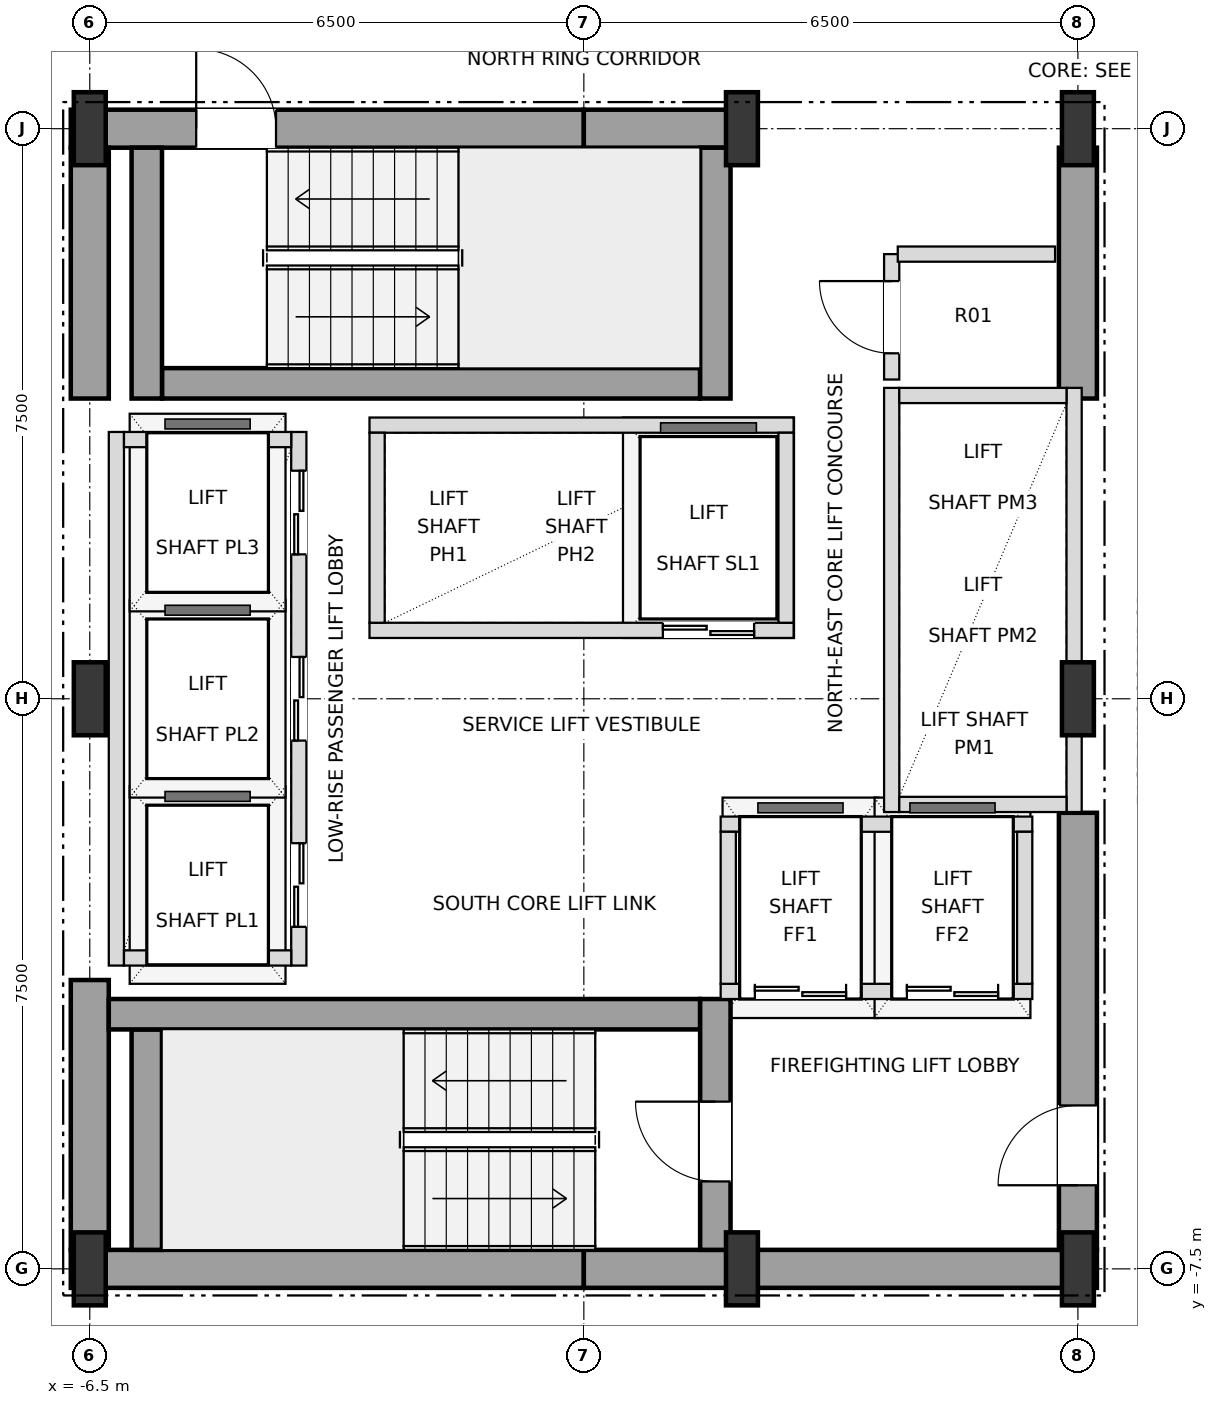
"""IFC4 building model, lengths in metres.
Left out: names, types, materials, properties, quantities, classifications, styles, units other than length and angle.
Written with IfcOpenShell. Run it as: python <this file> out.ifc"""

import sys

from ifc_helpers import new_model, si_unit, direction, frame, frame_2d, origin, origin_2d, place, context, subcontext, project, spatial, rectangle, i_section, extrude, element, fill, save


model = new_model("IFC4")
c1 = context("Model", 3, precision=1e-05, world=origin(), true_north=direction((0.0, 1.0)))
c2 = subcontext(c1, "Body", "Model", "MODEL_VIEW")
j1 = project(units=[si_unit("LENGTHUNIT", "METRE"), si_unit("PLANEANGLEUNIT", "RADIAN")], contexts=[c1])
p1 = place(None, origin())
s1 = spatial("IfcSite", under=j1, at=p1, CompositionType="ELEMENT")
p2 = place(p1, origin())
s2 = spatial("IfcBuilding", under=s1, at=p2, CompositionType="ELEMENT")
p3 = place(p2, frame((0.0, 0.0, 54.0)))
s3 = spatial("IfcBuildingStorey", under=s2, at=p3, CompositionType="ELEMENT", Elevation=54.0)
for number, where, z_axis, x_axis in (
    (1, (-6.5, -7.5, 0.0), (0.0, 0.0, 1.0), (1.0, 0.0, 0.0)),
    (2, (2.08, -7.5, 0.0), (0.0, 0.0, 1.0), (1.0, 0.0, 0.0)),
    (3, (6.5, -7.5, 0.0), (0.0, 0.0, 1.0), (1.0, 0.0, 0.0)),
    (4, (-6.5, 0.0, 0.0), (0.0, 0.0, 1.0), (1.0, 0.0, 0.0)),
    (5, (6.5, 0.0, 0.0), (0.0, 0.0, 1.0), (1.0, 0.0, 0.0)),
    (6, (-6.5, 7.5, 0.0), (0.0, 0.0, 1.0), (1.0, 0.0, 0.0)),
    (7, (2.08, 7.5, 0.0), (0.0, 0.0, 1.0), (1.0, 0.0, 0.0)),
    (8, (6.5, 7.5, 0.0), (0.0, 0.0, 1.0), (1.0, 0.0, 0.0)),
):
    element("IfcColumn", number, at=place(p3, frame(where, z_axis=z_axis, x_axis=x_axis)), inside=s3, PredefinedType="COLUMN", context=c2, shape_type="SweptSolid", body=[
        extrude(i_section(OverallWidth=0.42, OverallDepth=0.96, WebThickness=0.022, FlangeThickness=0.034, at=origin_2d()), origin(), (0.0, 0.0, 1.0), 3.6),
    ])
for number, where, z_axis, x_axis in (
    (9, (-6.75, -7.5, 0.0), (0.0, 0.0, 1.0), (1.0, 0.0, 0.0)),
    (10, (0.0, -7.5, 0.0), (0.0, 0.0, 1.0), (1.0, 0.0, 0.0)),
):
    element("IfcWall", number, at=place(p3, frame(where, z_axis=z_axis, x_axis=x_axis)), inside=s3, PredefinedType="SHEAR", context=c2, shape_type="SweptSolid", body=[
        extrude(rectangle(XDim=6.75, YDim=0.5, at=frame_2d((3.375, 0.0))), origin(), (0.0, 0.0, 1.0), 3.38),
    ])
p4 = place(p3, frame((-6.75, 7.5, 0.0), z_axis=(0.0, 0.0, 1.0), x_axis=(1.0, 0.0, 0.0)))
e11 = element("IfcWall", 11, at=p4, inside=s3, PredefinedType="SHEAR", context=c2, shape_type="SweptSolid", body=[
    extrude(rectangle(XDim=6.75, YDim=0.5, at=frame_2d((3.375, 0.0))), origin(), (0.0, 0.0, 1.0), 3.38),
])
p5 = place(p4, frame((1.65, 0.0, 0.0)))
e12 = element("IfcOpeningElement", 12, at=p5, cuts=e11, PredefinedType="OPENING", context=c2, shape_type="SweptSolid", body=[
    extrude(rectangle(XDim=1.05, YDim=2.15, at=frame_2d((0.525, 1.075))), frame((0.0, 0.26, 0.0), z_axis=(0.0, -1.0, 0.0), x_axis=(1.0, 0.0, 0.0)), (0.0, 0.0, 1.0), 0.52),
])
p6 = place(p3, frame((0.0, 7.5, 0.0), z_axis=(0.0, 0.0, 1.0), x_axis=(1.0, 0.0, 0.0)))
e13 = element("IfcWall", 13, at=p6, inside=s3, PredefinedType="SHEAR", context=c2, shape_type="SweptSolid", body=[
    extrude(rectangle(XDim=2.08, YDim=0.5, at=frame_2d((1.04, 0.0))), origin(), (0.0, 0.0, 1.0), 3.38),
])
p7 = place(p3, frame((-6.5, -7.25, 0.0), z_axis=(0.0, 0.0, 1.0), x_axis=(0.0, 1.0, 0.0)))
e14 = element("IfcWall", 14, at=p7, inside=s3, PredefinedType="SHEAR", context=c2, shape_type="SweptSolid", body=[
    extrude(rectangle(XDim=3.55, YDim=0.5, at=frame_2d((1.775, 0.0))), origin(), (0.0, 0.0, 1.0), 3.38),
])
p8 = place(p3, frame((-6.5, 3.95, 0.0), z_axis=(0.0, 0.0, 1.0), x_axis=(0.0, 1.0, 0.0)))
e15 = element("IfcWall", 15, at=p8, inside=s3, PredefinedType="SHEAR", context=c2, shape_type="SweptSolid", body=[
    extrude(rectangle(XDim=3.3, YDim=0.5, at=frame_2d((1.65, 0.0))), origin(), (0.0, 0.0, 1.0), 3.38),
])
p9 = place(p3, frame((6.5, -7.25, 0.0), z_axis=(0.0, 0.0, 1.0), x_axis=(0.0, 1.0, 0.0)))
e16 = element("IfcWall", 16, at=p9, inside=s3, PredefinedType="SHEAR", context=c2, shape_type="SweptSolid", body=[
    extrude(rectangle(XDim=5.75, YDim=0.5, at=frame_2d((2.875, 0.0))), origin(), (0.0, 0.0, 1.0), 3.38),
])
p10 = place(p9, frame((0.85, 0.0, 0.0)))
e17 = element("IfcOpeningElement", 17, at=p10, cuts=e16, PredefinedType="OPENING", context=c2, shape_type="SweptSolid", body=[
    extrude(rectangle(XDim=1.05, YDim=2.15, at=frame_2d((0.525, 1.075))), frame((0.0, 0.26, 0.0), z_axis=(0.0, -1.0, 0.0), x_axis=(1.0, 0.0, 0.0)), (0.0, 0.0, 1.0), 0.52),
])
p11 = place(p3, frame((6.5, 3.95, 0.0), z_axis=(0.0, 0.0, 1.0), x_axis=(0.0, 1.0, 0.0)))
e18 = element("IfcWall", 18, at=p11, inside=s3, PredefinedType="SHEAR", context=c2, shape_type="SweptSolid", body=[
    extrude(rectangle(XDim=3.3, YDim=0.5, at=frame_2d((1.65, 0.0))), origin(), (0.0, 0.0, 1.0), 3.38),
])
p12 = place(p3, frame((-5.75, -7.25, 0.0), z_axis=(0.0, 0.0, 1.0), x_axis=(0.0, 1.0, 0.0)))
e19 = element("IfcWall", 19, at=p12, inside=s3, PredefinedType="SHEAR", context=c2, shape_type="SweptSolid", body=[
    extrude(rectangle(XDim=2.9, YDim=0.4, at=frame_2d((1.45, 0.0))), origin(), (0.0, 0.0, 1.0), 3.38),
])
p13 = place(p3, frame((-6.25, -4.15, 0.0), z_axis=(0.0, 0.0, 1.0), x_axis=(1.0, 0.0, 0.0)))
e20 = element("IfcWall", 20, at=p13, inside=s3, PredefinedType="SHEAR", context=c2, shape_type="SweptSolid", body=[
    extrude(rectangle(XDim=7.78, YDim=0.4, at=frame_2d((3.89, 0.0))), origin(), (0.0, 0.0, 1.0), 3.38),
])
p14 = place(p3, frame((1.73, -7.25, 0.0), z_axis=(0.0, 0.0, 1.0), x_axis=(0.0, 1.0, 0.0)))
e21 = element("IfcWall", 21, at=p14, inside=s3, PredefinedType="SHEAR", context=c2, shape_type="SweptSolid", body=[
    extrude(rectangle(XDim=3.3, YDim=0.4, at=frame_2d((1.65, 0.0))), origin(), (0.0, 0.0, 1.0), 3.38),
])
p15 = place(p14, frame((0.9, 0.0, 0.0)))
e22 = element("IfcOpeningElement", 22, at=p15, cuts=e21, PredefinedType="OPENING", context=c2, shape_type="SweptSolid", body=[
    extrude(rectangle(XDim=1.05, YDim=2.15, at=frame_2d((0.525, 1.075))), frame((0.0, 0.21, 0.0), z_axis=(0.0, -1.0, 0.0), x_axis=(1.0, 0.0, 0.0)), (0.0, 0.0, 1.0), 0.42),
])
p16 = place(p3, frame((-5.55, 4.15, 0.0), z_axis=(0.0, 0.0, 1.0), x_axis=(1.0, 0.0, 0.0)))
e23 = element("IfcWall", 23, at=p16, inside=s3, PredefinedType="SHEAR", context=c2, shape_type="SweptSolid", body=[
    extrude(rectangle(XDim=7.08, YDim=0.4, at=frame_2d((3.54, 0.0))), origin(), (0.0, 0.0, 1.0), 3.38),
])
for number, where, z_axis, x_axis in (
    (24, (1.73, 3.95, 0.0), (0.0, 0.0, 1.0), (0.0, 1.0, 0.0)),
    (25, (-5.75, 3.95, 0.0), (0.0, 0.0, 1.0), (0.0, 1.0, 0.0)),
):
    element("IfcWall", number, at=place(p3, frame(where, z_axis=z_axis, x_axis=x_axis)), inside=s3, PredefinedType="SHEAR", context=c2, shape_type="SweptSolid", body=[
        extrude(rectangle(XDim=3.3, YDim=0.4, at=frame_2d((1.65, 0.0))), origin(), (0.0, 0.0, 1.0), 3.38),
    ])
p17 = place(p3, frame((-3.75, -3.51, 0.0), z_axis=(0.0, 0.0, 1.0), x_axis=(0.0, 1.0, 0.0)))
e26 = element("IfcWall", 26, at=p17, inside=s3, PredefinedType="SOLIDWALL", context=c2, shape_type="SweptSolid", body=[
    extrude(rectangle(XDim=7.02, YDim=0.2, at=frame_2d((3.51, 0.0))), origin(), (0.0, 0.0, 1.0), 3.38),
])
p18 = place(p17, frame((0.51, 0.0, 0.0)))
e27 = element("IfcOpeningElement", 27, at=p18, cuts=e26, PredefinedType="OPENING", context=c2, shape_type="SweptSolid", body=[
    extrude(rectangle(XDim=1.1, YDim=2.15, at=frame_2d((0.55, 1.075))), frame((0.0, 0.11, 0.0), z_axis=(0.0, -1.0, 0.0), x_axis=(1.0, 0.0, 0.0)), (0.0, 0.0, 1.0), 0.22),
])
p19 = place(p17, frame((2.96, 0.0, 0.0)))
e28 = element("IfcOpeningElement", 28, at=p19, cuts=e26, PredefinedType="OPENING", context=c2, shape_type="SweptSolid", body=[
    extrude(rectangle(XDim=1.1, YDim=2.15, at=frame_2d((0.55, 1.075))), frame((0.0, 0.11, 0.0), z_axis=(0.0, -1.0, 0.0), x_axis=(1.0, 0.0, 0.0)), (0.0, 0.0, 1.0), 0.22),
])
p20 = place(p17, frame((5.41, 0.0, 0.0)))
e29 = element("IfcOpeningElement", 29, at=p20, cuts=e26, PredefinedType="OPENING", context=c2, shape_type="SweptSolid", body=[
    extrude(rectangle(XDim=1.1, YDim=2.15, at=frame_2d((0.55, 1.075))), frame((0.0, 0.11, 0.0), z_axis=(0.0, -1.0, 0.0), x_axis=(1.0, 0.0, 0.0)), (0.0, 0.0, 1.0), 0.22),
])
p21 = place(p3, frame((-6.15, -3.51, 0.0), z_axis=(0.0, 0.0, 1.0), x_axis=(0.0, 1.0, 0.0)))
e30 = element("IfcWall", 30, at=p21, inside=s3, PredefinedType="SOLIDWALL", context=c2, shape_type="SweptSolid", body=[
    extrude(rectangle(XDim=7.02, YDim=0.2, at=frame_2d((3.51, 0.0))), origin(), (0.0, 0.0, 1.0), 3.38),
])
for number, where, z_axis, x_axis in (
    (31, (-6.05, -3.41, 0.0), (0.0, 0.0, 1.0), (1.0, 0.0, 0.0)),
    (32, (-6.05, 3.41, 0.0), (0.0, 0.0, 1.0), (1.0, 0.0, 0.0)),
):
    element("IfcWall", number, at=place(p3, frame(where, z_axis=z_axis, x_axis=x_axis)), inside=s3, PredefinedType="SOLIDWALL", context=c2, shape_type="SweptSolid", body=[
        extrude(rectangle(XDim=2.2, YDim=0.2, at=frame_2d((1.1, 0.0))), origin(), (0.0, 0.0, 1.0), 3.38),
    ])
p22 = place(p3, frame((4.05, -1.49, 0.0), z_axis=(0.0, 0.0, 1.0), x_axis=(0.0, 1.0, 0.0)))
e33 = element("IfcWall", 33, at=p22, inside=s3, PredefinedType="SOLIDWALL", context=c2, shape_type="SweptSolid", body=[
    extrude(rectangle(XDim=5.58, YDim=0.2, at=frame_2d((2.79, 0.0))), origin(), (0.0, 0.0, 1.0), 3.38),
])
p23 = place(p3, frame((6.45, -1.49, 0.0), z_axis=(0.0, 0.0, 1.0), x_axis=(0.0, 1.0, 0.0)))
e34 = element("IfcWall", 34, at=p23, inside=s3, PredefinedType="SOLIDWALL", context=c2, shape_type="SweptSolid", body=[
    extrude(rectangle(XDim=5.58, YDim=0.2, at=frame_2d((2.79, 0.0))), origin(), (0.0, 0.0, 1.0), 2.816),
])
for number, where, z_axis, x_axis in (
    (35, (4.15, -1.39, 0.0), (0.0, 0.0, 1.0), (1.0, 0.0, 0.0)),
    (36, (4.15, 3.99, 0.0), (0.0, 0.0, 1.0), (1.0, 0.0, 0.0)),
):
    element("IfcWall", number, at=place(p3, frame(where, z_axis=z_axis, x_axis=x_axis)), inside=s3, PredefinedType="SOLIDWALL", context=c2, shape_type="SweptSolid", body=[
        extrude(rectangle(XDim=2.2, YDim=0.2, at=frame_2d((1.1, 0.0))), origin(), (0.0, 0.0, 1.0), 3.38),
    ])
p24 = place(p3, frame((-2.82, 0.9, 0.0), z_axis=(0.0, 0.0, 1.0), x_axis=(1.0, 0.0, 0.0)))
e37 = element("IfcWall", 37, at=p24, inside=s3, PredefinedType="SOLIDWALL", context=c2, shape_type="SweptSolid", body=[
    extrude(rectangle(XDim=5.58, YDim=0.2, at=frame_2d((2.79, 0.0))), origin(), (0.0, 0.0, 1.0), 3.38),
])
p25 = place(p24, frame((3.86, 0.0, 0.0)))
e38 = element("IfcOpeningElement", 38, at=p25, cuts=e37, PredefinedType="OPENING", context=c2, shape_type="SweptSolid", body=[
    extrude(rectangle(XDim=1.2, YDim=2.2, at=frame_2d((0.6, 1.1))), frame((0.0, 0.11, 0.0), z_axis=(0.0, -1.0, 0.0), x_axis=(1.0, 0.0, 0.0)), (0.0, 0.0, 1.0), 0.22),
])
p26 = place(p3, frame((-2.82, 3.6, 0.0), z_axis=(0.0, 0.0, 1.0), x_axis=(1.0, 0.0, 0.0)))
e39 = element("IfcWall", 39, at=p26, inside=s3, PredefinedType="SOLIDWALL", context=c2, shape_type="SweptSolid", body=[
    extrude(rectangle(XDim=5.58, YDim=0.2, at=frame_2d((2.79, 0.0))), origin(), (0.0, 0.0, 1.0), 3.38),
])
for number, where, z_axis, x_axis in (
    (40, (-2.72, 1.0, 0.0), (0.0, 0.0, 1.0), (0.0, 1.0, 0.0)),
    (41, (2.66, 1.0, 0.0), (0.0, 0.0, 1.0), (0.0, 1.0, 0.0)),
):
    element("IfcWall", number, at=place(p3, frame(where, z_axis=z_axis, x_axis=x_axis)), inside=s3, PredefinedType="SOLIDWALL", context=c2, shape_type="SweptSolid", body=[
        extrude(rectangle(XDim=2.5, YDim=0.2, at=frame_2d((1.25, 0.0))), origin(), (0.0, 0.0, 1.0), 3.38),
    ])
p27 = place(p3, frame((1.8, -3.85, 0.0), z_axis=(0.0, 0.0, 1.0), x_axis=(1.0, 0.0, 0.0)))
e42 = element("IfcWall", 42, at=p27, inside=s3, PredefinedType="SOLIDWALL", context=c2, shape_type="SweptSolid", body=[
    extrude(rectangle(XDim=4.1, YDim=0.2, at=frame_2d((2.05, 0.0))), origin(), (0.0, 0.0, 1.0), 3.38),
])
p28 = place(p27, frame((0.45, 0.0, 0.0)))
e43 = element("IfcOpeningElement", 43, at=p28, cuts=e42, PredefinedType="OPENING", context=c2, shape_type="SweptSolid", body=[
    extrude(rectangle(XDim=1.2, YDim=2.2, at=frame_2d((0.6, 1.1))), frame((0.0, 0.11, 0.0), z_axis=(0.0, -1.0, 0.0), x_axis=(1.0, 0.0, 0.0)), (0.0, 0.0, 1.0), 0.22),
])
p29 = place(p27, frame((2.45, 0.0, 0.0)))
e44 = element("IfcOpeningElement", 44, at=p29, cuts=e42, PredefinedType="OPENING", context=c2, shape_type="SweptSolid", body=[
    extrude(rectangle(XDim=1.2, YDim=2.2, at=frame_2d((0.6, 1.1))), frame((0.0, 0.11, 0.0), z_axis=(0.0, -1.0, 0.0), x_axis=(1.0, 0.0, 0.0)), (0.0, 0.0, 1.0), 0.22),
])
p30 = place(p3, frame((1.8, -1.65, 0.0), z_axis=(0.0, 0.0, 1.0), x_axis=(1.0, 0.0, 0.0)))
e45 = element("IfcWall", 45, at=p30, inside=s3, PredefinedType="SOLIDWALL", context=c2, shape_type="SweptSolid", body=[
    extrude(rectangle(XDim=4.1, YDim=0.2, at=frame_2d((2.05, 0.0))), origin(), (0.0, 0.0, 1.0), 3.38),
])
for number, where, z_axis, x_axis in (
    (46, (1.9, -3.75, 0.0), (0.0, 0.0, 1.0), (0.0, 1.0, 0.0)),
    (47, (5.8, -3.75, 0.0), (0.0, 0.0, 1.0), (0.0, 1.0, 0.0)),
):
    element("IfcWall", number, at=place(p3, frame(where, z_axis=z_axis, x_axis=x_axis)), inside=s3, PredefinedType="SOLIDWALL", context=c2, shape_type="SweptSolid", body=[
        extrude(rectangle(XDim=2.0, YDim=0.2, at=frame_2d((1.0, 0.0))), origin(), (0.0, 0.0, 1.0), 3.38),
    ])
p31 = place(p3, frame((4.05, 4.2, 0.0), z_axis=(0.0, 0.0, 1.0), x_axis=(0.0, 1.0, 0.0)))
e48 = element("IfcWall", 48, at=p31, inside=s3, PredefinedType="SOLIDWALL", context=c2, shape_type="SweptSolid", body=[
    extrude(rectangle(XDim=1.65, YDim=0.2, at=frame_2d((0.825, 0.0))), origin(), (0.0, 0.0, 1.0), 3.38),
])
p32 = place(p31, frame((0.345, 0.0, 0.0)))
e49 = element("IfcOpeningElement", 49, at=p32, cuts=e48, PredefinedType="OPENING", context=c2, shape_type="SweptSolid", body=[
    extrude(rectangle(XDim=0.95, YDim=2.15, at=frame_2d((0.475, 1.075))), frame((0.0, 0.11, 0.0), z_axis=(0.0, -1.0, 0.0), x_axis=(1.0, 0.0, 0.0)), (0.0, 0.0, 1.0), 0.22),
])
p33 = place(p3, frame((4.13, 5.85, 0.0), z_axis=(0.0, 0.0, 1.0), x_axis=(1.0, 0.0, 0.0)))
e50 = element("IfcWall", 50, at=p33, inside=s3, PredefinedType="SOLIDWALL", context=c2, shape_type="SweptSolid", body=[
    extrude(rectangle(XDim=2.07, YDim=0.2, at=frame_2d((1.035, 0.0))), origin(), (0.0, 0.0, 1.0), 3.38),
])
p34 = place(p10, origin())
e51 = element("IfcDoor", 51, at=p34, inside=s3, OperationType="SINGLE_SWING_LEFT", PredefinedType="DOOR", context=c2, shape_type="SweptSolid", body=[
    extrude(rectangle(XDim=1.05, YDim=2.15, at=frame_2d((0.525, 1.075))), frame((0.0, 0.025, 0.0), z_axis=(0.0, -1.0, 0.0), x_axis=(1.0, 0.0, 0.0)), (0.0, 0.0, 1.0), 0.05),
])
fill(e17, e51)
p35 = place(p15, origin())
e52 = element("IfcDoor", 52, at=p35, inside=s3, OperationType="SINGLE_SWING_RIGHT", PredefinedType="DOOR", context=c2, shape_type="SweptSolid", body=[
    extrude(rectangle(XDim=1.05, YDim=2.15, at=frame_2d((0.525, 1.075))), frame((0.0, 0.025, 0.0), z_axis=(0.0, -1.0, 0.0), x_axis=(1.0, 0.0, 0.0)), (0.0, 0.0, 1.0), 0.05),
])
fill(e22, e52)
p36 = place(p5, origin())
e53 = element("IfcDoor", 53, at=p36, inside=s3, OperationType="SINGLE_SWING_LEFT", PredefinedType="DOOR", context=c2, shape_type="SweptSolid", body=[
    extrude(rectangle(XDim=1.05, YDim=2.15, at=frame_2d((0.525, 1.075))), frame((0.0, 0.025, 0.0), z_axis=(0.0, -1.0, 0.0), x_axis=(1.0, 0.0, 0.0)), (0.0, 0.0, 1.0), 0.05),
])
fill(e12, e53)
p37 = place(p18, origin())
e54 = element("IfcDoor", 54, at=p37, inside=s3, OperationType="DOUBLE_DOOR_SLIDING", PredefinedType="DOOR", context=c2, shape_type="SweptSolid", body=[
    extrude(rectangle(XDim=1.1, YDim=2.15, at=frame_2d((0.55, 1.075))), frame((0.0, 0.025, 0.0), z_axis=(0.0, -1.0, 0.0), x_axis=(1.0, 0.0, 0.0)), (0.0, 0.0, 1.0), 0.05),
])
fill(e27, e54)
p38 = place(p19, origin())
e55 = element("IfcDoor", 55, at=p38, inside=s3, OperationType="DOUBLE_DOOR_SLIDING", PredefinedType="DOOR", context=c2, shape_type="SweptSolid", body=[
    extrude(rectangle(XDim=1.1, YDim=2.15, at=frame_2d((0.55, 1.075))), frame((0.0, 0.025, 0.0), z_axis=(0.0, -1.0, 0.0), x_axis=(1.0, 0.0, 0.0)), (0.0, 0.0, 1.0), 0.05),
])
fill(e28, e55)
p39 = place(p20, origin())
e56 = element("IfcDoor", 56, at=p39, inside=s3, OperationType="DOUBLE_DOOR_SLIDING", PredefinedType="DOOR", context=c2, shape_type="SweptSolid", body=[
    extrude(rectangle(XDim=1.1, YDim=2.15, at=frame_2d((0.55, 1.075))), frame((0.0, 0.025, 0.0), z_axis=(0.0, -1.0, 0.0), x_axis=(1.0, 0.0, 0.0)), (0.0, 0.0, 1.0), 0.05),
])
fill(e29, e56)
p40 = place(p25, origin())
e57 = element("IfcDoor", 57, at=p40, inside=s3, OperationType="DOUBLE_DOOR_SLIDING", PredefinedType="DOOR", context=c2, shape_type="SweptSolid", body=[
    extrude(rectangle(XDim=1.2, YDim=2.2, at=frame_2d((0.6, 1.1))), frame((0.0, 0.025, 0.0), z_axis=(0.0, -1.0, 0.0), x_axis=(1.0, 0.0, 0.0)), (0.0, 0.0, 1.0), 0.05),
])
fill(e38, e57)
p41 = place(p28, origin())
e58 = element("IfcDoor", 58, at=p41, inside=s3, OperationType="DOUBLE_DOOR_SLIDING", PredefinedType="DOOR", context=c2, shape_type="SweptSolid", body=[
    extrude(rectangle(XDim=1.2, YDim=2.2, at=frame_2d((0.6, 1.1))), frame((0.0, 0.025, 0.0), z_axis=(0.0, -1.0, 0.0), x_axis=(1.0, 0.0, 0.0)), (0.0, 0.0, 1.0), 0.05),
])
fill(e43, e58)
p42 = place(p29, origin())
e59 = element("IfcDoor", 59, at=p42, inside=s3, OperationType="DOUBLE_DOOR_SLIDING", PredefinedType="DOOR", context=c2, shape_type="SweptSolid", body=[
    extrude(rectangle(XDim=1.2, YDim=2.2, at=frame_2d((0.6, 1.1))), frame((0.0, 0.025, 0.0), z_axis=(0.0, -1.0, 0.0), x_axis=(1.0, 0.0, 0.0)), (0.0, 0.0, 1.0), 0.05),
])
fill(e44, e59)
p43 = place(p32, origin())
e60 = element("IfcDoor", 60, at=p43, inside=s3, OperationType="SINGLE_SWING_RIGHT", PredefinedType="DOOR", context=c2, shape_type="SweptSolid", body=[
    extrude(rectangle(XDim=0.95, YDim=2.15, at=frame_2d((0.475, 1.075))), frame((0.0, 0.025, 0.0), z_axis=(0.0, -1.0, 0.0), x_axis=(1.0, 0.0, 0.0)), (0.0, 0.0, 1.0), 0.05),
])
fill(e49, e60)
save(model, sys.argv[1])
